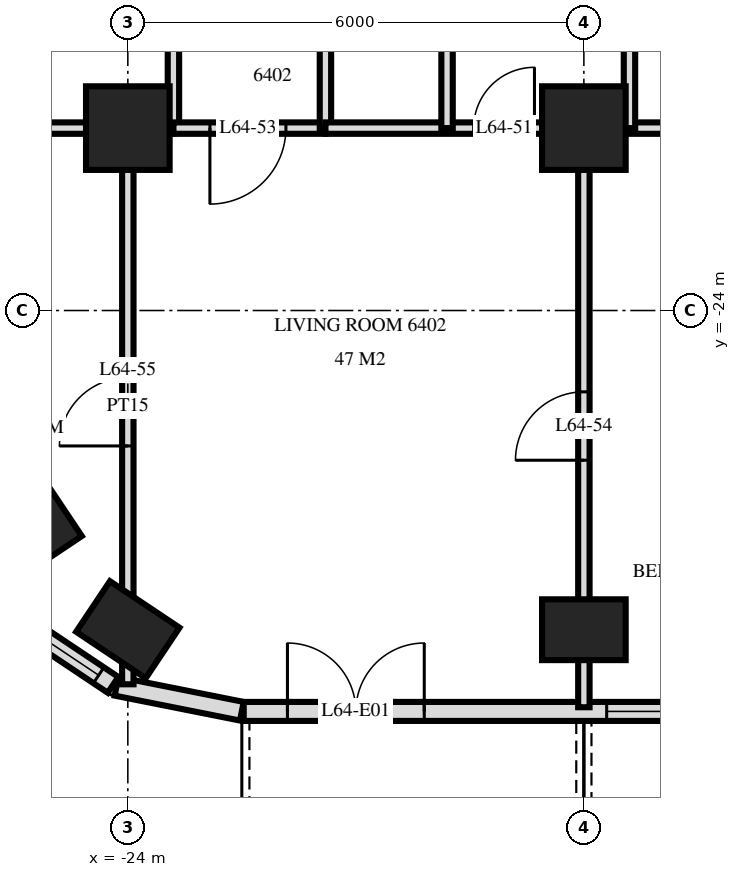
"""IFC4 building model, lengths in metres.
Left out: names, types, materials, properties, quantities, classifications, styles, units other than length and angle.
Written with IfcOpenShell. Run it as: python <this file> out.ifc"""

import sys

from ifc_helpers import new_model, si_unit, direction, frame, frame_2d, origin, origin_2d, place, context, subcontext, project, spatial, rectangle, extrude, element, fill, save


model = new_model("IFC4")
c1 = context("Model", 3, precision=1e-05, world=origin(), true_north=direction((0.0, 1.0)))
c2 = subcontext(c1, "Body", "Model", "MODEL_VIEW")
j1 = project(units=[si_unit("LENGTHUNIT", "METRE"), si_unit("PLANEANGLEUNIT", "RADIAN")], contexts=[c1])
p1 = place(None, origin())
s1 = spatial("IfcSite", under=j1, at=p1, CompositionType="ELEMENT")
p2 = place(p1, origin())
s2 = spatial("IfcBuilding", under=s1, at=p2, CompositionType="ELEMENT")
p3 = place(p2, frame((0.0, 0.0, 243.1)))
s3 = spatial("IfcBuildingStorey", under=s2, at=p3, CompositionType="ELEMENT", Elevation=243.1)
for number, where, z_axis, x_axis in (
    (1, (-25.244, -26.733, 0.0), (0.0, 0.0, 1.0), (-0.556, 0.831, 0.0)),
    (2, (-24.0, -28.2, 0.0), (0.0, 0.0, 1.0), (-0.831, 0.556, 0.0)),
):
    element("IfcColumn", number, at=place(p3, frame(where, z_axis=z_axis, x_axis=x_axis)), inside=s3, PredefinedType="COLUMN", context=c2, shape_type="SweptSolid", body=[
        extrude(rectangle(XDim=1.1, YDim=0.8, at=origin_2d()), origin(), (0.0, 0.0, 1.0), 3.5),
    ])
p4 = place(p3, frame((-24.0, -21.6, 0.0), z_axis=(0.0, 0.0, 1.0), x_axis=(1.0, 0.0, 0.0)))
e3 = element("IfcColumn", 3, at=p4, inside=s3, PredefinedType="COLUMN", context=c2, shape_type="SweptSolid", body=[
    extrude(rectangle(XDim=1.1, YDim=1.1, at=origin_2d()), origin(), (0.0, 0.0, 1.0), 3.5),
])
p5 = place(p3, frame((-18.0, -28.2, 0.0), z_axis=(0.0, 0.0, 1.0), x_axis=(1.0, 0.0, 0.0)))
e4 = element("IfcColumn", 4, at=p5, inside=s3, PredefinedType="COLUMN", context=c2, shape_type="SweptSolid", body=[
    extrude(rectangle(XDim=1.1, YDim=0.8, at=origin_2d()), origin(), (0.0, 0.0, 1.0), 3.5),
])
p6 = place(p3, frame((-18.0, -21.6, 0.0), z_axis=(0.0, 0.0, 1.0), x_axis=(1.0, 0.0, 0.0)))
e5 = element("IfcColumn", 5, at=p6, inside=s3, PredefinedType="COLUMN", context=c2, shape_type="SweptSolid", body=[
    extrude(rectangle(XDim=1.1, YDim=1.1, at=origin_2d()), origin(), (0.0, 0.0, 1.0), 3.5),
])
p7 = place(p3, frame((-25.571, -28.006, 0.0), z_axis=(0.0, 0.0, 1.0), x_axis=(0.831482937015, -0.55555029066, 0.0)))
e6 = element("IfcWall", 6, at=p7, inside=s3, PredefinedType="SOLIDWALL", context=c2, shape_type="SweptSolid", body=[
    extrude(rectangle(XDim=1.656, YDim=0.25, at=frame_2d((0.828, 0.0))), origin(), (0.0, 0.0, 1.0), 3.2),
])
p8 = place(p7, frame((0.228, 0.0, 0.9)))
e7 = element("IfcOpeningElement", 7, at=p8, cuts=e6, PredefinedType="OPENING", context=c2, shape_type="SweptSolid", body=[
    extrude(rectangle(XDim=1.2, YDim=1.5, at=frame_2d((0.6, 0.75))), frame((0.0, 0.135, 0.0), z_axis=(0.0, -1.0, 0.0), x_axis=(1.0, 0.0, 0.0)), (0.0, 0.0, 1.0), 0.27),
])
p9 = place(p3, frame((-24.149, -28.945, 0.0), z_axis=(0.0, 0.0, 1.0), x_axis=(0.980775640221, -0.19513878023, 0.0)))
e8 = element("IfcWall", 8, at=p9, inside=s3, PredefinedType="SOLIDWALL", context=c2, shape_type="SweptSolid", body=[
    extrude(rectangle(XDim=1.681, YDim=0.25, at=frame_2d((0.841, 0.0))), origin(), (0.0, 0.0, 1.0), 3.2),
])
p10 = place(p3, frame((-22.475, -29.275, 0.0), z_axis=(0.0, 0.0, 1.0), x_axis=(1.0, 0.0, 0.0)))
e9 = element("IfcWall", 9, at=p10, inside=s3, PredefinedType="SOLIDWALL", context=c2, shape_type="SweptSolid", body=[
    extrude(rectangle(XDim=44.951, YDim=0.25, at=frame_2d((22.475, 0.0))), origin(), (0.0, 0.0, 1.0), 3.2),
])
p11 = place(p10, frame((0.575, 0.0, 0.0)))
e10 = element("IfcOpeningElement", 10, at=p11, cuts=e9, PredefinedType="OPENING", context=c2, shape_type="SweptSolid", body=[
    extrude(rectangle(XDim=1.8, YDim=2.4, at=frame_2d((0.9, 1.2))), frame((0.0, 0.135, 0.0), z_axis=(0.0, -1.0, 0.0), x_axis=(1.0, 0.0, 0.0)), (0.0, 0.0, 1.0), 0.27),
])
p12 = place(p10, frame((4.775, 0.0, 0.9)))
e11 = element("IfcOpeningElement", 11, at=p12, cuts=e9, PredefinedType="OPENING", context=c2, shape_type="SweptSolid", body=[
    extrude(rectangle(XDim=2.4, YDim=1.5, at=frame_2d((1.2, 0.75))), frame((0.0, 0.135, 0.0), z_axis=(0.0, -1.0, 0.0), x_axis=(1.0, 0.0, 0.0)), (0.0, 0.0, 1.0), 0.27),
])
p13 = place(p10, frame((8.075, 0.0, 0.0)))
e12 = element("IfcOpeningElement", 12, at=p13, cuts=e9, PredefinedType="OPENING", context=c2, shape_type="SweptSolid", body=[
    extrude(rectangle(XDim=1.8, YDim=2.4, at=frame_2d((0.9, 1.2))), frame((0.0, 0.135, 0.0), z_axis=(0.0, -1.0, 0.0), x_axis=(1.0, 0.0, 0.0)), (0.0, 0.0, 1.0), 0.27),
])
p14 = place(p10, frame((11.075, 0.0, 0.0)))
e13 = element("IfcOpeningElement", 13, at=p14, cuts=e9, PredefinedType="OPENING", context=c2, shape_type="SweptSolid", body=[
    extrude(rectangle(XDim=1.8, YDim=2.4, at=frame_2d((0.9, 1.2))), frame((0.0, 0.135, 0.0), z_axis=(0.0, -1.0, 0.0), x_axis=(1.0, 0.0, 0.0)), (0.0, 0.0, 1.0), 0.27),
])
p15 = place(p10, frame((13.775, 0.0, 0.9)))
e14 = element("IfcOpeningElement", 14, at=p15, cuts=e9, PredefinedType="OPENING", context=c2, shape_type="SweptSolid", body=[
    extrude(rectangle(XDim=2.4, YDim=1.5, at=frame_2d((1.2, 0.75))), frame((0.0, 0.135, 0.0), z_axis=(0.0, -1.0, 0.0), x_axis=(1.0, 0.0, 0.0)), (0.0, 0.0, 1.0), 0.27),
])
p16 = place(p10, frame((16.775, 0.0, 0.9)))
e15 = element("IfcOpeningElement", 15, at=p16, cuts=e9, PredefinedType="OPENING", context=c2, shape_type="SweptSolid", body=[
    extrude(rectangle(XDim=2.4, YDim=1.5, at=frame_2d((1.2, 0.75))), frame((0.0, 0.135, 0.0), z_axis=(0.0, -1.0, 0.0), x_axis=(1.0, 0.0, 0.0)), (0.0, 0.0, 1.0), 0.27),
])
p17 = place(p10, frame((20.075, 0.0, 0.0)))
e16 = element("IfcOpeningElement", 16, at=p17, cuts=e9, PredefinedType="OPENING", context=c2, shape_type="SweptSolid", body=[
    extrude(rectangle(XDim=1.8, YDim=2.4, at=frame_2d((0.9, 1.2))), frame((0.0, 0.135, 0.0), z_axis=(0.0, -1.0, 0.0), x_axis=(1.0, 0.0, 0.0)), (0.0, 0.0, 1.0), 0.27),
])
p18 = place(p10, frame((23.075, 0.0, 0.0)))
e17 = element("IfcOpeningElement", 17, at=p18, cuts=e9, PredefinedType="OPENING", context=c2, shape_type="SweptSolid", body=[
    extrude(rectangle(XDim=1.8, YDim=2.4, at=frame_2d((0.9, 1.2))), frame((0.0, 0.135, 0.0), z_axis=(0.0, -1.0, 0.0), x_axis=(1.0, 0.0, 0.0)), (0.0, 0.0, 1.0), 0.27),
])
p19 = place(p10, frame((25.775, 0.0, 0.9)))
e18 = element("IfcOpeningElement", 18, at=p19, cuts=e9, PredefinedType="OPENING", context=c2, shape_type="SweptSolid", body=[
    extrude(rectangle(XDim=2.4, YDim=1.5, at=frame_2d((1.2, 0.75))), frame((0.0, 0.135, 0.0), z_axis=(0.0, -1.0, 0.0), x_axis=(1.0, 0.0, 0.0)), (0.0, 0.0, 1.0), 0.27),
])
p20 = place(p10, frame((29.075, 0.0, 0.0)))
e19 = element("IfcOpeningElement", 19, at=p20, cuts=e9, PredefinedType="OPENING", context=c2, shape_type="SweptSolid", body=[
    extrude(rectangle(XDim=1.8, YDim=2.4, at=frame_2d((0.9, 1.2))), frame((0.0, 0.135, 0.0), z_axis=(0.0, -1.0, 0.0), x_axis=(1.0, 0.0, 0.0)), (0.0, 0.0, 1.0), 0.27),
])
p21 = place(p10, frame((31.775, 0.0, 0.9)))
e20 = element("IfcOpeningElement", 20, at=p21, cuts=e9, PredefinedType="OPENING", context=c2, shape_type="SweptSolid", body=[
    extrude(rectangle(XDim=2.4, YDim=1.5, at=frame_2d((1.2, 0.75))), frame((0.0, 0.135, 0.0), z_axis=(0.0, -1.0, 0.0), x_axis=(1.0, 0.0, 0.0)), (0.0, 0.0, 1.0), 0.27),
])
p22 = place(p10, frame((35.075, 0.0, 0.0)))
e21 = element("IfcOpeningElement", 21, at=p22, cuts=e9, PredefinedType="OPENING", context=c2, shape_type="SweptSolid", body=[
    extrude(rectangle(XDim=1.8, YDim=2.4, at=frame_2d((0.9, 1.2))), frame((0.0, 0.135, 0.0), z_axis=(0.0, -1.0, 0.0), x_axis=(1.0, 0.0, 0.0)), (0.0, 0.0, 1.0), 0.27),
])
p23 = place(p10, frame((41.075, 0.0, 0.0)))
e22 = element("IfcOpeningElement", 22, at=p23, cuts=e9, PredefinedType="OPENING", context=c2, shape_type="SweptSolid", body=[
    extrude(rectangle(XDim=1.8, YDim=2.4, at=frame_2d((0.9, 1.2))), frame((0.0, 0.135, 0.0), z_axis=(0.0, -1.0, 0.0), x_axis=(1.0, 0.0, 0.0)), (0.0, 0.0, 1.0), 0.27),
])
p24 = place(p3, frame((-17.4, -21.6, 0.0), z_axis=(0.0, 0.0, 1.0), x_axis=(0.0, 1.0, 0.0)))
e23 = element("IfcWall", 23, at=p24, inside=s3, PredefinedType="PARTITIONING", context=c2, shape_type="SweptSolid", body=[
    extrude(rectangle(XDim=4.2, YDim=0.15, at=frame_2d((2.1, 0.0))), origin(), (0.0, 0.0, 1.0), 3.22),
])
p25 = place(p3, frame((-18.0, -29.22, 0.0), z_axis=(0.0, 0.0, 1.0), x_axis=(0.0, 1.0, 0.0)))
e24 = element("IfcWall", 24, at=p25, inside=s3, PredefinedType="PARTITIONING", context=c2, shape_type="SweptSolid", body=[
    extrude(rectangle(XDim=7.62, YDim=0.15, at=frame_2d((3.81, 0.0))), origin(), (0.0, 0.0, 1.0), 3.22),
])
p26 = place(p25, frame((3.25, 0.0, 0.0)))
e25 = element("IfcOpeningElement", 25, at=p26, cuts=e24, PredefinedType="OPENING", context=c2, shape_type="SweptSolid", body=[
    extrude(rectangle(XDim=0.9, YDim=2.1, at=frame_2d((0.45, 1.05))), frame((0.0, 0.085, 0.0), z_axis=(0.0, -1.0, 0.0), x_axis=(1.0, 0.0, 0.0)), (0.0, 0.0, 1.0), 0.17),
])
for number, where, z_axis, x_axis in (
    (26, (-19.8, -21.6, 0.0), (0.0, 0.0, 1.0), (0.0, 1.0, 0.0)),
    (27, (-21.4, -21.6, 0.0), (0.0, 0.0, 1.0), (0.0, 1.0, 0.0)),
):
    element("IfcWall", number, at=place(p3, frame(where, z_axis=z_axis, x_axis=x_axis)), inside=s3, PredefinedType="PARTITIONING", context=c2, shape_type="SweptSolid", body=[
        extrude(rectangle(XDim=4.2, YDim=0.15, at=frame_2d((2.1, 0.0))), origin(), (0.0, 0.0, 1.0), 3.22),
    ])
p27 = place(p3, frame((-23.4, -21.6, 0.0), z_axis=(0.0, 0.0, 1.0), x_axis=(0.0, 1.0, 0.0)))
e28 = element("IfcWall", 28, at=p27, inside=s3, PredefinedType="PARTITIONING", context=c2, shape_type="SweptSolid", body=[
    extrude(rectangle(XDim=4.2, YDim=0.15, at=frame_2d((2.1, 0.0))), origin(), (0.0, 0.0, 1.0), 3.22),
])
p28 = place(p27, frame((1.58, 0.0, 0.0)))
e29 = element("IfcOpeningElement", 29, at=p28, cuts=e28, PredefinedType="OPENING", context=c2, shape_type="SweptSolid", body=[
    extrude(rectangle(XDim=1.0, YDim=2.1, at=frame_2d((0.5, 1.05))), frame((0.0, 0.085, 0.0), z_axis=(0.0, -1.0, 0.0), x_axis=(1.0, 0.0, 0.0)), (0.0, 0.0, 1.0), 0.17),
])
p29 = place(p3, frame((-24.0, -28.918, 0.0), z_axis=(0.0, 0.0, 1.0), x_axis=(0.0, 1.0, 0.0)))
e30 = element("IfcWall", 30, at=p29, inside=s3, PredefinedType="PARTITIONING", context=c2, shape_type="SweptSolid", body=[
    extrude(rectangle(XDim=7.318, YDim=0.15, at=frame_2d((3.659, 0.0))), origin(), (0.0, 0.0, 1.0), 3.22),
])
p30 = place(p29, frame((3.136, 0.0, 0.0)))
e31 = element("IfcOpeningElement", 31, at=p30, cuts=e30, PredefinedType="OPENING", context=c2, shape_type="SweptSolid", body=[
    extrude(rectangle(XDim=0.9, YDim=2.1, at=frame_2d((0.45, 1.05))), frame((0.0, 0.085, 0.0), z_axis=(0.0, -1.0, 0.0), x_axis=(1.0, 0.0, 0.0)), (0.0, 0.0, 1.0), 0.17),
])
p31 = place(p3, frame((-23.4, -21.6, 0.0), z_axis=(0.0, 0.0, 1.0), x_axis=(1.0, 0.0, 0.0)))
e32 = element("IfcWall", 32, at=p31, inside=s3, PredefinedType="PARTITIONING", context=c2, shape_type="SweptSolid", body=[
    extrude(rectangle(XDim=2.0, YDim=0.15, at=frame_2d((1.0, 0.0))), origin(), (0.0, 0.0, 1.0), 3.22),
])
p32 = place(p31, frame((0.48, 0.0, 0.0)))
e33 = element("IfcOpeningElement", 33, at=p32, cuts=e32, PredefinedType="OPENING", context=c2, shape_type="SweptSolid", body=[
    extrude(rectangle(XDim=1.0, YDim=2.1, at=frame_2d((0.5, 1.05))), frame((0.0, 0.085, 0.0), z_axis=(0.0, -1.0, 0.0), x_axis=(1.0, 0.0, 0.0)), (0.0, 0.0, 1.0), 0.17),
])
p33 = place(p3, frame((-26.82, -21.6, 0.0), z_axis=(0.0, 0.0, 1.0), x_axis=(1.0, 0.0, 0.0)))
e34 = element("IfcWall", 34, at=p33, inside=s3, PredefinedType="PARTITIONING", context=c2, shape_type="SweptSolid", body=[
    extrude(rectangle(XDim=3.42, YDim=0.15, at=frame_2d((1.71, 0.0))), origin(), (0.0, 0.0, 1.0), 3.22),
])
p34 = place(p3, frame((-21.4, -21.6, 0.0), z_axis=(0.0, 0.0, 1.0), x_axis=(1.0, 0.0, 0.0)))
e35 = element("IfcWall", 35, at=p34, inside=s3, PredefinedType="PARTITIONING", context=c2, shape_type="SweptSolid", body=[
    extrude(rectangle(XDim=6.4, YDim=0.15, at=frame_2d((3.2, 0.0))), origin(), (0.0, 0.0, 1.0), 3.22),
])
p35 = place(p34, frame((4.78, 0.0, 0.0)))
e36 = element("IfcOpeningElement", 36, at=p35, cuts=e35, PredefinedType="OPENING", context=c2, shape_type="SweptSolid", body=[
    extrude(rectangle(XDim=0.8, YDim=2.1, at=frame_2d((0.4, 1.05))), frame((0.0, 0.085, 0.0), z_axis=(0.0, -1.0, 0.0), x_axis=(1.0, 0.0, 0.0)), (0.0, 0.0, 1.0), 0.17),
])
p36 = place(p34, frame((1.95, 0.0, 0.0)))
e37 = element("IfcOpeningElement", 37, at=p36, cuts=e35, PredefinedType="OPENING", context=c2, shape_type="SweptSolid", body=[
    extrude(rectangle(XDim=0.8, YDim=2.1, at=frame_2d((0.4, 1.05))), frame((0.0, 0.085, 0.0), z_axis=(0.0, -1.0, 0.0), x_axis=(1.0, 0.0, 0.0)), (0.0, 0.0, 1.0), 0.17),
])
p37 = place(p8, origin())
e38 = element("IfcWindow", 38, at=p37, inside=s3, PartitioningType="SINGLE_PANEL", PredefinedType="WINDOW", context=c2, shape_type="SweptSolid", body=[
    extrude(rectangle(XDim=1.2, YDim=1.5, at=frame_2d((0.6, 0.75))), frame((0.0, 0.03, 0.0), z_axis=(0.0, -1.0, 0.0), x_axis=(1.0, 0.0, 0.0)), (0.0, 0.0, 1.0), 0.06),
])
fill(e7, e38)
p38 = place(p11, origin())
e39 = element("IfcDoor", 39, at=p38, inside=s3, OperationType="DOUBLE_DOOR_SINGLE_SWING", PredefinedType="DOOR", context=c2, shape_type="SweptSolid", body=[
    extrude(rectangle(XDim=1.8, YDim=2.4, at=frame_2d((0.9, 1.2))), frame((0.0, 0.025, 0.0), z_axis=(0.0, -1.0, 0.0), x_axis=(1.0, 0.0, 0.0)), (0.0, 0.0, 1.0), 0.05),
])
fill(e10, e39)
p39 = place(p12, origin())
e40 = element("IfcWindow", 40, at=p39, inside=s3, PartitioningType="SINGLE_PANEL", PredefinedType="WINDOW", context=c2, shape_type="SweptSolid", body=[
    extrude(rectangle(XDim=2.4, YDim=1.5, at=frame_2d((1.2, 0.75))), frame((0.0, 0.03, 0.0), z_axis=(0.0, -1.0, 0.0), x_axis=(1.0, 0.0, 0.0)), (0.0, 0.0, 1.0), 0.06),
])
fill(e11, e40)
p40 = place(p36, origin())
e41 = element("IfcDoor", 41, at=p40, inside=s3, OperationType="SINGLE_SWING_LEFT", PredefinedType="DOOR", context=c2, shape_type="SweptSolid", body=[
    extrude(rectangle(XDim=0.8, YDim=2.1, at=frame_2d((0.4, 1.05))), frame((0.0, 0.025, 0.0), z_axis=(0.0, -1.0, 0.0), x_axis=(1.0, 0.0, 0.0)), (0.0, 0.0, 1.0), 0.05),
])
fill(e37, e41)
p41 = place(p32, frame((0.5, 0.0, 0.0), z_axis=(0.0, 0.0, 1.0), x_axis=(-1.0, 0.0, 0.0)))
e42 = element("IfcDoor", 42, at=p41, inside=s3, OperationType="SINGLE_SWING_LEFT", PredefinedType="DOOR", context=c2, shape_type="SweptSolid", body=[
    extrude(rectangle(XDim=1.0, YDim=2.1, at=frame_2d((0.0, 1.05))), frame((0.0, -0.025, 0.0), z_axis=(0.0, 1.0, 0.0), x_axis=(-1.0, 0.0, 0.0)), (0.0, 0.0, 1.0), 0.05),
])
fill(e33, e42)
p42 = place(p26, origin())
e43 = element("IfcDoor", 43, at=p42, inside=s3, OperationType="SINGLE_SWING_RIGHT", PredefinedType="DOOR", context=c2, shape_type="SweptSolid", body=[
    extrude(rectangle(XDim=0.9, YDim=2.1, at=frame_2d((0.45, 1.05))), frame((0.0, 0.025, 0.0), z_axis=(0.0, -1.0, 0.0), x_axis=(1.0, 0.0, 0.0)), (0.0, 0.0, 1.0), 0.05),
])
fill(e25, e43)
p43 = place(p30, origin())
e44 = element("IfcDoor", 44, at=p43, inside=s3, OperationType="SINGLE_SWING_RIGHT", PredefinedType="DOOR", context=c2, shape_type="SweptSolid", body=[
    extrude(rectangle(XDim=0.9, YDim=2.1, at=frame_2d((0.45, 1.05))), frame((0.0, 0.025, 0.0), z_axis=(0.0, -1.0, 0.0), x_axis=(1.0, 0.0, 0.0)), (0.0, 0.0, 1.0), 0.05),
])
fill(e31, e44)
save(model, sys.argv[1])
